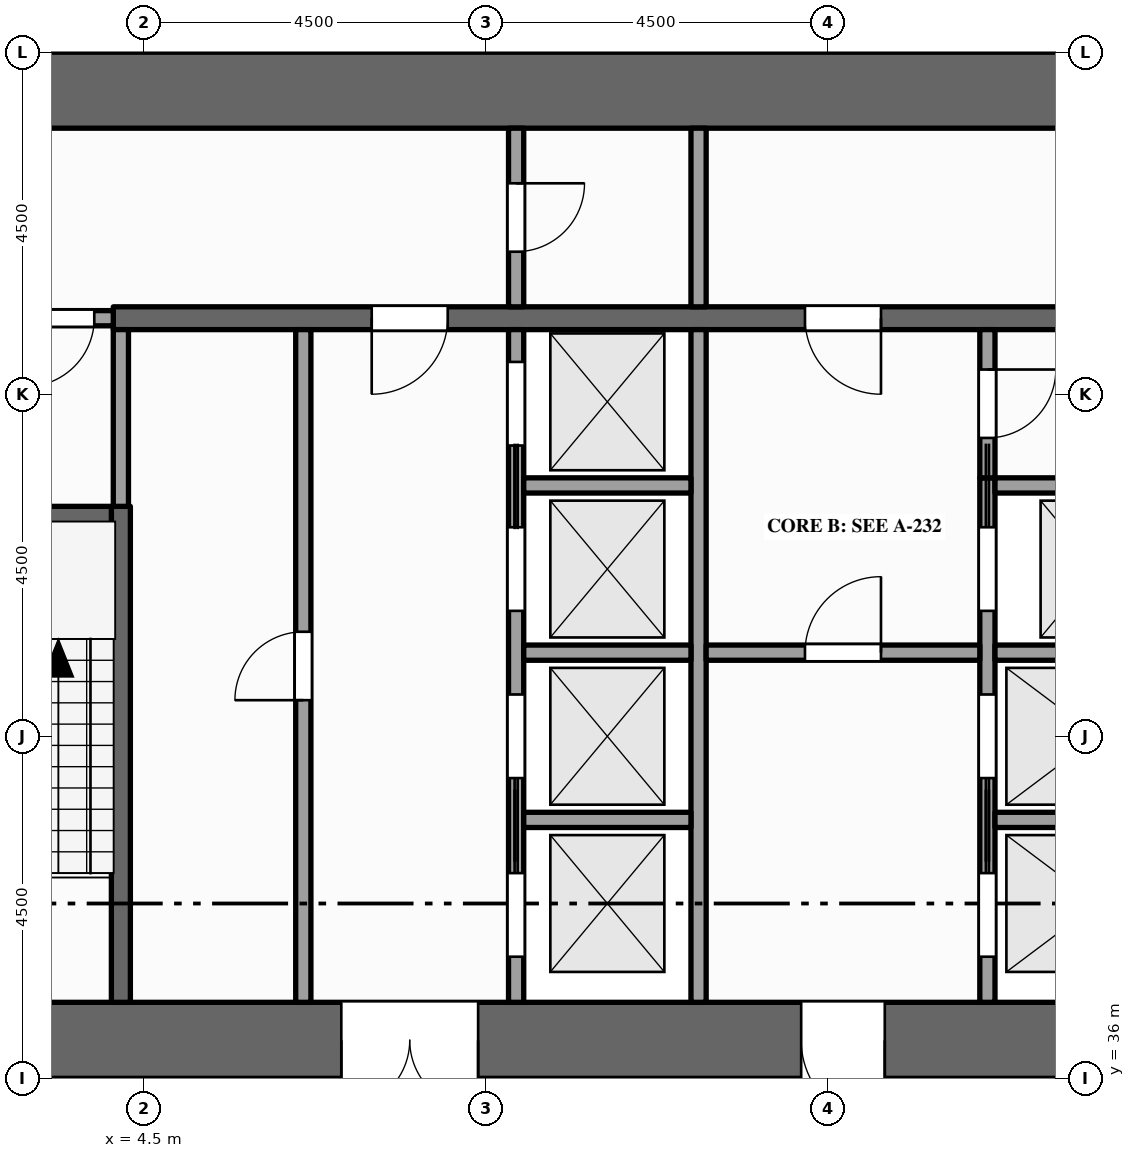
"""IFC4 building model, lengths in metres.
Left out: names, types, materials, properties, quantities, classifications, styles, units other than length and angle.
Written with IfcOpenShell. Run it as: python <this file> out.ifc"""

import sys

from ifc_helpers import new_model, si_unit, direction, frame, frame_2d, origin, place, context, subcontext, project, spatial, rectangle, extrude, element, fill, save


model = new_model("IFC4")
c1 = context("Model", 3, precision=1e-05, world=origin(), true_north=direction((0.0, 1.0)))
c2 = subcontext(c1, "Body", "Model", "MODEL_VIEW")
j1 = project(units=[si_unit("LENGTHUNIT", "METRE"), si_unit("PLANEANGLEUNIT", "RADIAN")], contexts=[c1])
p1 = place(None, origin())
s1 = spatial("IfcSite", under=j1, at=p1, CompositionType="ELEMENT")
p2 = place(p1, origin())
s2 = spatial("IfcBuilding", under=s1, at=p2, CompositionType="ELEMENT")
p3 = place(p2, frame((0.0, 0.0, 179.0)))
s3 = spatial("IfcBuildingStorey", under=s2, at=p3, CompositionType="ELEMENT", Elevation=179.0)
p4 = place(p3, frame((0.0, 36.5, -0.15), z_axis=(0.0, 0.0, 1.0), x_axis=(1.0, 0.0, 0.0)))
e1 = element("IfcWall", 1, at=p4, inside=s3, PredefinedType="SHEAR", context=c2, shape_type="SweptSolid", body=[
    extrude(rectangle(XDim=22.5, YDim=1.0, at=frame_2d((11.25, 0.0))), origin(), (0.0, 0.0, 1.0), 4.0),
])
p5 = place(p4, frame((7.1, 0.0, 0.15)))
e2 = element("IfcOpeningElement", 2, at=p5, cuts=e1, PredefinedType="OPENING", context=c2, shape_type="SweptSolid", body=[
    extrude(rectangle(XDim=1.8, YDim=2.1, at=frame_2d((0.9, 1.05))), frame((0.0, 0.51, 0.0), z_axis=(0.0, -1.0, 0.0), x_axis=(1.0, 0.0, 0.0)), (0.0, 0.0, 1.0), 1.02),
])
p6 = place(p4, frame((13.15, 0.0, 0.15)))
e3 = element("IfcOpeningElement", 3, at=p6, cuts=e1, PredefinedType="OPENING", context=c2, shape_type="SweptSolid", body=[
    extrude(rectangle(XDim=1.1, YDim=2.1, at=frame_2d((0.55, 1.05))), frame((0.0, 0.51, 0.0), z_axis=(0.0, -1.0, 0.0), x_axis=(1.0, 0.0, 0.0)), (0.0, 0.0, 1.0), 1.02),
])
p7 = place(p4, frame((2.15, 0.0, 0.15)))
e4 = element("IfcOpeningElement", 4, at=p7, cuts=e1, PredefinedType="OPENING", context=c2, shape_type="SweptSolid", body=[
    extrude(rectangle(XDim=1.1, YDim=2.1, at=frame_2d((0.55, 1.05))), frame((0.0, 0.51, 0.0), z_axis=(0.0, -1.0, 0.0), x_axis=(1.0, 0.0, 0.0)), (0.0, 0.0, 1.0), 1.02),
])
p8 = place(p4, frame((19.35, 0.0, 0.15)))
e5 = element("IfcOpeningElement", 5, at=p8, cuts=e1, PredefinedType="OPENING", context=c2, shape_type="SweptSolid", body=[
    extrude(rectangle(XDim=1.1, YDim=2.1, at=frame_2d((0.55, 1.05))), frame((0.0, 0.51, 0.0), z_axis=(0.0, -1.0, 0.0), x_axis=(1.0, 0.0, 0.0)), (0.0, 0.0, 1.0), 1.02),
])
p9 = place(p3, frame((0.0, 49.0, -0.15), z_axis=(0.0, 0.0, 1.0), x_axis=(1.0, 0.0, 0.0)))
e6 = element("IfcWall", 6, at=p9, inside=s3, PredefinedType="SHEAR", context=c2, shape_type="SweptSolid", body=[
    extrude(rectangle(XDim=22.5, YDim=1.0, at=frame_2d((11.25, 0.0))), origin(), (0.0, 0.0, 1.0), 4.0),
])
p10 = place(p3, frame((4.2, 37.0, 0.0), z_axis=(0.0, 0.0, 1.0), x_axis=(0.0, 1.0, 0.0)))
e7 = element("IfcWall", 7, at=p10, inside=s3, PredefinedType="SHEAR", context=c2, shape_type="SweptSolid", body=[
    extrude(rectangle(XDim=6.525, YDim=0.25, at=frame_2d((3.262, 0.0))), origin(), (0.0, 0.0, 1.0), 3.85),
])
p11 = place(p3, frame((4.2, 43.525, 0.0), z_axis=(0.0, 0.0, 1.0), x_axis=(0.0, 1.0, 0.0)))
e8 = element("IfcWall", 8, at=p11, inside=s3, PredefinedType="PARTITIONING", context=c2, shape_type="SweptSolid", body=[
    extrude(rectangle(XDim=2.325, YDim=0.2, at=frame_2d((1.163, 0.0))), origin(), (0.0, 0.0, 1.0), 3.85),
])
p12 = place(p3, frame((6.6, 37.0, 0.0), z_axis=(0.0, 0.0, 1.0), x_axis=(0.0, 1.0, 0.0)))
e9 = element("IfcWall", 9, at=p12, inside=s3, PredefinedType="PARTITIONING", context=c2, shape_type="SweptSolid", body=[
    extrude(rectangle(XDim=8.85, YDim=0.2, at=frame_2d((4.425, 0.0))), origin(), (0.0, 0.0, 1.0), 3.85),
])
p13 = place(p12, frame((3.975, 0.0, 0.0)))
e10 = element("IfcOpeningElement", 10, at=p13, cuts=e9, PredefinedType="OPENING", context=c2, shape_type="SweptSolid", body=[
    extrude(rectangle(XDim=0.9, YDim=2.1, at=frame_2d((0.45, 1.05))), frame((0.0, 0.11, 0.0), z_axis=(0.0, -1.0, 0.0), x_axis=(1.0, 0.0, 0.0)), (0.0, 0.0, 1.0), 0.22),
])
p14 = place(p3, frame((9.4, 37.0, 0.0), z_axis=(0.0, 0.0, 1.0), x_axis=(0.0, 1.0, 0.0)))
e11 = element("IfcWall", 11, at=p14, inside=s3, PredefinedType="SOLIDWALL", context=c2, shape_type="SweptSolid", body=[
    extrude(rectangle(XDim=8.85, YDim=0.2, at=frame_2d((4.425, 0.0))), origin(), (0.0, 0.0, 1.0), 3.85),
])
p15 = place(p14, frame((0.6, 0.0, 0.012)))
e12 = element("IfcOpeningElement", 12, at=p15, cuts=e11, PredefinedType="OPENING", context=c2, shape_type="SweptSolid", body=[
    extrude(rectangle(XDim=1.1, YDim=2.1, at=frame_2d((0.55, 1.05))), frame((0.0, 0.11, 0.0), z_axis=(0.0, -1.0, 0.0), x_axis=(1.0, 0.0, 0.0)), (0.0, 0.0, 1.0), 0.22),
])
p16 = place(p14, frame((2.95, 0.0, 0.012)))
e13 = element("IfcOpeningElement", 13, at=p16, cuts=e11, PredefinedType="OPENING", context=c2, shape_type="SweptSolid", body=[
    extrude(rectangle(XDim=1.1, YDim=2.1, at=frame_2d((0.55, 1.05))), frame((0.0, 0.11, 0.0), z_axis=(0.0, -1.0, 0.0), x_axis=(1.0, 0.0, 0.0)), (0.0, 0.0, 1.0), 0.22),
])
p17 = place(p14, frame((5.15, 0.0, 0.012)))
e14 = element("IfcOpeningElement", 14, at=p17, cuts=e11, PredefinedType="OPENING", context=c2, shape_type="SweptSolid", body=[
    extrude(rectangle(XDim=1.1, YDim=2.1, at=frame_2d((0.55, 1.05))), frame((0.0, 0.11, 0.0), z_axis=(0.0, -1.0, 0.0), x_axis=(1.0, 0.0, 0.0)), (0.0, 0.0, 1.0), 0.22),
])
p18 = place(p14, frame((7.325, 0.0, 0.012)))
e15 = element("IfcOpeningElement", 15, at=p18, cuts=e11, PredefinedType="OPENING", context=c2, shape_type="SweptSolid", body=[
    extrude(rectangle(XDim=1.1, YDim=2.1, at=frame_2d((0.55, 1.05))), frame((0.0, 0.11, 0.0), z_axis=(0.0, -1.0, 0.0), x_axis=(1.0, 0.0, 0.0)), (0.0, 0.0, 1.0), 0.22),
])
p19 = place(p3, frame((9.4, 46.15, 0.0), z_axis=(0.0, 0.0, 1.0), x_axis=(0.0, 1.0, 0.0)))
e16 = element("IfcWall", 16, at=p19, inside=s3, PredefinedType="PARTITIONING", context=c2, shape_type="SweptSolid", body=[
    extrude(rectangle(XDim=2.35, YDim=0.2, at=frame_2d((1.175, 0.0))), origin(), (0.0, 0.0, 1.0), 3.85),
])
p20 = place(p19, frame((0.725, 0.0, 0.0)))
e17 = element("IfcOpeningElement", 17, at=p20, cuts=e16, PredefinedType="OPENING", context=c2, shape_type="SweptSolid", body=[
    extrude(rectangle(XDim=0.9, YDim=2.1, at=frame_2d((0.45, 1.05))), frame((0.0, 0.11, 0.0), z_axis=(0.0, -1.0, 0.0), x_axis=(1.0, 0.0, 0.0)), (0.0, 0.0, 1.0), 0.22),
])
p21 = place(p3, frame((11.8, 37.0, 0.0), z_axis=(0.0, 0.0, 1.0), x_axis=(0.0, 1.0, 0.0)))
e18 = element("IfcWall", 18, at=p21, inside=s3, PredefinedType="SOLIDWALL", context=c2, shape_type="SweptSolid", body=[
    extrude(rectangle(XDim=8.85, YDim=0.2, at=frame_2d((4.425, 0.0))), origin(), (0.0, 0.0, 1.0), 3.85),
])
p22 = place(p3, frame((11.8, 46.15, 0.0), z_axis=(0.0, 0.0, 1.0), x_axis=(0.0, 1.0, 0.0)))
e19 = element("IfcWall", 19, at=p22, inside=s3, PredefinedType="PARTITIONING", context=c2, shape_type="SweptSolid", body=[
    extrude(rectangle(XDim=2.35, YDim=0.2, at=frame_2d((1.175, 0.0))), origin(), (0.0, 0.0, 1.0), 3.85),
])
p23 = place(p3, frame((15.6, 37.0, 0.0), z_axis=(0.0, 0.0, 1.0), x_axis=(0.0, 1.0, 0.0)))
e20 = element("IfcWall", 20, at=p23, inside=s3, PredefinedType="SOLIDWALL", context=c2, shape_type="SweptSolid", body=[
    extrude(rectangle(XDim=6.9, YDim=0.2, at=frame_2d((3.45, 0.0))), origin(), (0.0, 0.0, 1.0), 3.85),
])
p24 = place(p23, frame((0.6, 0.0, 0.012)))
e21 = element("IfcOpeningElement", 21, at=p24, cuts=e20, PredefinedType="OPENING", context=c2, shape_type="SweptSolid", body=[
    extrude(rectangle(XDim=1.1, YDim=2.1, at=frame_2d((0.55, 1.05))), frame((0.0, 0.11, 0.0), z_axis=(0.0, -1.0, 0.0), x_axis=(1.0, 0.0, 0.0)), (0.0, 0.0, 1.0), 0.22),
])
p25 = place(p23, frame((2.95, 0.0, 0.012)))
e22 = element("IfcOpeningElement", 22, at=p25, cuts=e20, PredefinedType="OPENING", context=c2, shape_type="SweptSolid", body=[
    extrude(rectangle(XDim=1.1, YDim=2.1, at=frame_2d((0.55, 1.05))), frame((0.0, 0.11, 0.0), z_axis=(0.0, -1.0, 0.0), x_axis=(1.0, 0.0, 0.0)), (0.0, 0.0, 1.0), 0.22),
])
p26 = place(p23, frame((5.15, 0.0, 0.012)))
e23 = element("IfcOpeningElement", 23, at=p26, cuts=e20, PredefinedType="OPENING", context=c2, shape_type="SweptSolid", body=[
    extrude(rectangle(XDim=1.1, YDim=2.1, at=frame_2d((0.55, 1.05))), frame((0.0, 0.11, 0.0), z_axis=(0.0, -1.0, 0.0), x_axis=(1.0, 0.0, 0.0)), (0.0, 0.0, 1.0), 0.22),
])
p27 = place(p3, frame((15.6, 43.9, 0.0), z_axis=(0.0, 0.0, 1.0), x_axis=(0.0, 1.0, 0.0)))
e24 = element("IfcWall", 24, at=p27, inside=s3, PredefinedType="PARTITIONING", context=c2, shape_type="SweptSolid", body=[
    extrude(rectangle(XDim=1.95, YDim=0.2, at=frame_2d((0.975, 0.0))), origin(), (0.0, 0.0, 1.0), 3.85),
])
p28 = place(p27, frame((0.525, 0.0, 0.0)))
e25 = element("IfcOpeningElement", 25, at=p28, cuts=e24, PredefinedType="OPENING", context=c2, shape_type="SweptSolid", body=[
    extrude(rectangle(XDim=0.9, YDim=2.1, at=frame_2d((0.45, 1.05))), frame((0.0, 0.11, 0.0), z_axis=(0.0, -1.0, 0.0), x_axis=(1.0, 0.0, 0.0)), (0.0, 0.0, 1.0), 0.22),
])
p29 = place(p3, frame((9.5, 39.4, 0.0), z_axis=(0.0, 0.0, 1.0), x_axis=(1.0, 0.0, 0.0)))
e26 = element("IfcWall", 26, at=p29, inside=s3, PredefinedType="SOLIDWALL", context=c2, shape_type="SweptSolid", body=[
    extrude(rectangle(XDim=2.2, YDim=0.2, at=frame_2d((1.1, 0.0))), origin(), (0.0, 0.0, 1.0), 3.85),
])
p30 = place(p3, frame((15.7, 39.4, 0.0), z_axis=(0.0, 0.0, 1.0), x_axis=(1.0, 0.0, 0.0)))
e27 = element("IfcWall", 27, at=p30, inside=s3, PredefinedType="SOLIDWALL", context=c2, shape_type="SweptSolid", body=[
    extrude(rectangle(XDim=2.675, YDim=0.2, at=frame_2d((1.337, 0.0))), origin(), (0.0, 0.0, 1.0), 3.85),
])
p31 = place(p3, frame((9.5, 41.6, 0.0), z_axis=(0.0, 0.0, 1.0), x_axis=(1.0, 0.0, 0.0)))
e28 = element("IfcWall", 28, at=p31, inside=s3, PredefinedType="SOLIDWALL", context=c2, shape_type="SweptSolid", body=[
    extrude(rectangle(XDim=2.2, YDim=0.2, at=frame_2d((1.1, 0.0))), origin(), (0.0, 0.0, 1.0), 3.85),
])
p32 = place(p3, frame((11.9, 41.6, 0.0), z_axis=(0.0, 0.0, 1.0), x_axis=(1.0, 0.0, 0.0)))
e29 = element("IfcWall", 29, at=p32, inside=s3, PredefinedType="PARTITIONING", context=c2, shape_type="SweptSolid", body=[
    extrude(rectangle(XDim=3.6, YDim=0.2, at=frame_2d((1.8, 0.0))), origin(), (0.0, 0.0, 1.0), 3.85),
])
p33 = place(p32, frame((1.3, 0.0, 0.0)))
e30 = element("IfcOpeningElement", 30, at=p33, cuts=e29, PredefinedType="OPENING", context=c2, shape_type="SweptSolid", body=[
    extrude(rectangle(XDim=1.0, YDim=2.1, at=frame_2d((0.5, 1.05))), frame((0.0, 0.11, 0.0), z_axis=(0.0, -1.0, 0.0), x_axis=(1.0, 0.0, 0.0)), (0.0, 0.0, 1.0), 0.22),
])
p34 = place(p3, frame((15.7, 41.6, 0.0), z_axis=(0.0, 0.0, 1.0), x_axis=(1.0, 0.0, 0.0)))
e31 = element("IfcWall", 31, at=p34, inside=s3, PredefinedType="SOLIDWALL", context=c2, shape_type="SweptSolid", body=[
    extrude(rectangle(XDim=2.675, YDim=0.2, at=frame_2d((1.337, 0.0))), origin(), (0.0, 0.0, 1.0), 3.85),
])
p35 = place(p3, frame((1.0, 43.4, 0.0), z_axis=(0.0, 0.0, 1.0), x_axis=(1.0, 0.0, 0.0)))
e32 = element("IfcWall", 32, at=p35, inside=s3, PredefinedType="SHEAR", context=c2, shape_type="SweptSolid", body=[
    extrude(rectangle(XDim=3.075, YDim=0.25, at=frame_2d((1.538, 0.0))), origin(), (0.0, 0.0, 1.0), 3.85),
])
p36 = place(p3, frame((9.5, 43.8, 0.0), z_axis=(0.0, 0.0, 1.0), x_axis=(1.0, 0.0, 0.0)))
e33 = element("IfcWall", 33, at=p36, inside=s3, PredefinedType="SOLIDWALL", context=c2, shape_type="SweptSolid", body=[
    extrude(rectangle(XDim=2.2, YDim=0.2, at=frame_2d((1.1, 0.0))), origin(), (0.0, 0.0, 1.0), 3.85),
])
p37 = place(p3, frame((15.7, 43.8, 0.0), z_axis=(0.0, 0.0, 1.0), x_axis=(1.0, 0.0, 0.0)))
e34 = element("IfcWall", 34, at=p37, inside=s3, PredefinedType="SOLIDWALL", context=c2, shape_type="SweptSolid", body=[
    extrude(rectangle(XDim=2.7, YDim=0.2, at=frame_2d((1.35, 0.0))), origin(), (0.0, 0.0, 1.0), 3.85),
])
p38 = place(p3, frame((2.7, 46.0, 0.0), z_axis=(0.0, 0.0, 1.0), x_axis=(1.0, 0.0, 0.0)))
e35 = element("IfcWall", 35, at=p38, inside=s3, PredefinedType="PARTITIONING", context=c2, shape_type="SweptSolid", body=[
    extrude(rectangle(XDim=1.4, YDim=0.2, at=frame_2d((0.7, 0.0))), origin(), (0.0, 0.0, 1.0), 3.85),
])
p39 = place(p38, frame((0.25, 0.0, 0.0)))
e36 = element("IfcOpeningElement", 36, at=p39, cuts=e35, PredefinedType="OPENING", context=c2, shape_type="SweptSolid", body=[
    extrude(rectangle(XDim=0.9, YDim=2.1, at=frame_2d((0.45, 1.05))), frame((0.0, 0.11, 0.0), z_axis=(0.0, -1.0, 0.0), x_axis=(1.0, 0.0, 0.0)), (0.0, 0.0, 1.0), 0.22),
])
p40 = place(p3, frame((4.1, 46.0, 0.0), z_axis=(0.0, 0.0, 1.0), x_axis=(1.0, 0.0, 0.0)))
e37 = element("IfcWall", 37, at=p40, inside=s3, PredefinedType="SHEAR", context=c2, shape_type="SweptSolid", body=[
    extrude(rectangle(XDim=14.5, YDim=0.3, at=frame_2d((7.25, 0.0))), origin(), (0.0, 0.0, 1.0), 3.85),
])
p41 = place(p40, frame((3.4, 0.0, 0.0)))
e38 = element("IfcOpeningElement", 38, at=p41, cuts=e37, PredefinedType="OPENING", context=c2, shape_type="SweptSolid", body=[
    extrude(rectangle(XDim=1.0, YDim=2.1, at=frame_2d((0.5, 1.05))), frame((0.0, 0.16, 0.0), z_axis=(0.0, -1.0, 0.0), x_axis=(1.0, 0.0, 0.0)), (0.0, 0.0, 1.0), 0.32),
])
p42 = place(p40, frame((9.1, 0.0, 0.0)))
e39 = element("IfcOpeningElement", 39, at=p42, cuts=e37, PredefinedType="OPENING", context=c2, shape_type="SweptSolid", body=[
    extrude(rectangle(XDim=1.0, YDim=2.1, at=frame_2d((0.5, 1.05))), frame((0.0, 0.16, 0.0), z_axis=(0.0, -1.0, 0.0), x_axis=(1.0, 0.0, 0.0)), (0.0, 0.0, 1.0), 0.32),
])
p43 = place(p15, origin())
e40 = element("IfcDoor", 40, at=p43, inside=s3, OperationType="SLIDING_TO_RIGHT", PredefinedType="DOOR", context=c2, shape_type="SweptSolid", body=[
    extrude(rectangle(XDim=1.1, YDim=2.1, at=frame_2d((0.55, 1.05))), frame((0.0, 0.025, 0.0), z_axis=(0.0, -1.0, 0.0), x_axis=(1.0, 0.0, 0.0)), (0.0, 0.0, 1.0), 0.05),
])
fill(e12, e40)
p44 = place(p16, origin())
e41 = element("IfcDoor", 41, at=p44, inside=s3, OperationType="SLIDING_TO_LEFT", PredefinedType="DOOR", context=c2, shape_type="SweptSolid", body=[
    extrude(rectangle(XDim=1.1, YDim=2.1, at=frame_2d((0.55, 1.05))), frame((0.0, 0.025, 0.0), z_axis=(0.0, -1.0, 0.0), x_axis=(1.0, 0.0, 0.0)), (0.0, 0.0, 1.0), 0.05),
])
fill(e13, e41)
p45 = place(p17, origin())
e42 = element("IfcDoor", 42, at=p45, inside=s3, OperationType="SLIDING_TO_RIGHT", PredefinedType="DOOR", context=c2, shape_type="SweptSolid", body=[
    extrude(rectangle(XDim=1.1, YDim=2.1, at=frame_2d((0.55, 1.05))), frame((0.0, 0.025, 0.0), z_axis=(0.0, -1.0, 0.0), x_axis=(1.0, 0.0, 0.0)), (0.0, 0.0, 1.0), 0.05),
])
fill(e14, e42)
p46 = place(p18, origin())
e43 = element("IfcDoor", 43, at=p46, inside=s3, OperationType="SLIDING_TO_LEFT", PredefinedType="DOOR", context=c2, shape_type="SweptSolid", body=[
    extrude(rectangle(XDim=1.1, YDim=2.1, at=frame_2d((0.55, 1.05))), frame((0.0, 0.025, 0.0), z_axis=(0.0, -1.0, 0.0), x_axis=(1.0, 0.0, 0.0)), (0.0, 0.0, 1.0), 0.05),
])
fill(e15, e43)
p47 = place(p24, origin())
e44 = element("IfcDoor", 44, at=p47, inside=s3, OperationType="SLIDING_TO_RIGHT", PredefinedType="DOOR", context=c2, shape_type="SweptSolid", body=[
    extrude(rectangle(XDim=1.1, YDim=2.1, at=frame_2d((0.55, 1.05))), frame((0.0, 0.025, 0.0), z_axis=(0.0, -1.0, 0.0), x_axis=(1.0, 0.0, 0.0)), (0.0, 0.0, 1.0), 0.05),
])
fill(e21, e44)
p48 = place(p25, origin())
e45 = element("IfcDoor", 45, at=p48, inside=s3, OperationType="SLIDING_TO_LEFT", PredefinedType="DOOR", context=c2, shape_type="SweptSolid", body=[
    extrude(rectangle(XDim=1.1, YDim=2.1, at=frame_2d((0.55, 1.05))), frame((0.0, 0.025, 0.0), z_axis=(0.0, -1.0, 0.0), x_axis=(1.0, 0.0, 0.0)), (0.0, 0.0, 1.0), 0.05),
])
fill(e22, e45)
p49 = place(p26, origin())
e46 = element("IfcDoor", 46, at=p49, inside=s3, OperationType="SLIDING_TO_RIGHT", PredefinedType="DOOR", context=c2, shape_type="SweptSolid", body=[
    extrude(rectangle(XDim=1.1, YDim=2.1, at=frame_2d((0.55, 1.05))), frame((0.0, 0.025, 0.0), z_axis=(0.0, -1.0, 0.0), x_axis=(1.0, 0.0, 0.0)), (0.0, 0.0, 1.0), 0.05),
])
fill(e23, e46)
p50 = place(p5, origin())
e47 = element("IfcDoor", 47, at=p50, inside=s3, OperationType="DOUBLE_DOOR_SINGLE_SWING", PredefinedType="DOOR", context=c2, shape_type="SweptSolid", body=[
    extrude(rectangle(XDim=1.8, YDim=2.1, at=frame_2d((0.9, 1.05))), frame((0.0, 0.025, 0.0), z_axis=(0.0, -1.0, 0.0), x_axis=(1.0, 0.0, 0.0)), (0.0, 0.0, 1.0), 0.05),
])
fill(e2, e47)
p51 = place(p41, origin())
e48 = element("IfcDoor", 48, at=p51, inside=s3, OperationType="SINGLE_SWING_LEFT", PredefinedType="DOOR", context=c2, shape_type="SweptSolid", body=[
    extrude(rectangle(XDim=1.0, YDim=2.1, at=frame_2d((0.5, 1.05))), frame((0.0, 0.025, 0.0), z_axis=(0.0, -1.0, 0.0), x_axis=(1.0, 0.0, 0.0)), (0.0, 0.0, 1.0), 0.05),
])
fill(e38, e48)
p52 = place(p6, origin())
e49 = element("IfcDoor", 49, at=p52, inside=s3, OperationType="SINGLE_SWING_RIGHT", PredefinedType="DOOR", context=c2, shape_type="SweptSolid", body=[
    extrude(rectangle(XDim=1.1, YDim=2.1, at=frame_2d((0.55, 1.05))), frame((0.0, 0.025, 0.0), z_axis=(0.0, -1.0, 0.0), x_axis=(1.0, 0.0, 0.0)), (0.0, 0.0, 1.0), 0.05),
])
fill(e3, e49)
p53 = place(p33, origin())
e50 = element("IfcDoor", 50, at=p53, inside=s3, OperationType="SINGLE_SWING_RIGHT", PredefinedType="DOOR", context=c2, shape_type="SweptSolid", body=[
    extrude(rectangle(XDim=1.0, YDim=2.1, at=frame_2d((0.5, 1.05))), frame((0.0, 0.025, 0.0), z_axis=(0.0, -1.0, 0.0), x_axis=(1.0, 0.0, 0.0)), (0.0, 0.0, 1.0), 0.05),
])
fill(e30, e50)
p54 = place(p42, origin())
e51 = element("IfcDoor", 51, at=p54, inside=s3, OperationType="SINGLE_SWING_RIGHT", PredefinedType="DOOR", context=c2, shape_type="SweptSolid", body=[
    extrude(rectangle(XDim=1.0, YDim=2.1, at=frame_2d((0.5, 1.05))), frame((0.0, 0.025, 0.0), z_axis=(0.0, -1.0, 0.0), x_axis=(1.0, 0.0, 0.0)), (0.0, 0.0, 1.0), 0.05),
])
fill(e39, e51)
p55 = place(p20, origin())
e52 = element("IfcDoor", 52, at=p55, inside=s3, OperationType="SINGLE_SWING_RIGHT", PredefinedType="DOOR", context=c2, shape_type="SweptSolid", body=[
    extrude(rectangle(XDim=0.9, YDim=2.1, at=frame_2d((0.45, 1.05))), frame((0.0, 0.025, 0.0), z_axis=(0.0, -1.0, 0.0), x_axis=(1.0, 0.0, 0.0)), (0.0, 0.0, 1.0), 0.05),
])
fill(e17, e52)
p56 = place(p39, origin())
e53 = element("IfcDoor", 53, at=p56, inside=s3, OperationType="SINGLE_SWING_LEFT", PredefinedType="DOOR", context=c2, shape_type="SweptSolid", body=[
    extrude(rectangle(XDim=0.9, YDim=2.1, at=frame_2d((0.45, 1.05))), frame((0.0, 0.025, 0.0), z_axis=(0.0, -1.0, 0.0), x_axis=(1.0, 0.0, 0.0)), (0.0, 0.0, 1.0), 0.05),
])
fill(e36, e53)
p57 = place(p13, origin())
e54 = element("IfcDoor", 54, at=p57, inside=s3, OperationType="SINGLE_SWING_LEFT", PredefinedType="DOOR", context=c2, shape_type="SweptSolid", body=[
    extrude(rectangle(XDim=0.9, YDim=2.1, at=frame_2d((0.45, 1.05))), frame((0.0, 0.025, 0.0), z_axis=(0.0, -1.0, 0.0), x_axis=(1.0, 0.0, 0.0)), (0.0, 0.0, 1.0), 0.05),
])
fill(e10, e54)
p58 = place(p28, origin())
e55 = element("IfcDoor", 55, at=p58, inside=s3, OperationType="SINGLE_SWING_RIGHT", PredefinedType="DOOR", context=c2, shape_type="SweptSolid", body=[
    extrude(rectangle(XDim=0.9, YDim=2.1, at=frame_2d((0.45, 1.05))), frame((0.0, 0.025, 0.0), z_axis=(0.0, -1.0, 0.0), x_axis=(1.0, 0.0, 0.0)), (0.0, 0.0, 1.0), 0.05),
])
fill(e25, e55)
save(model, sys.argv[1])
